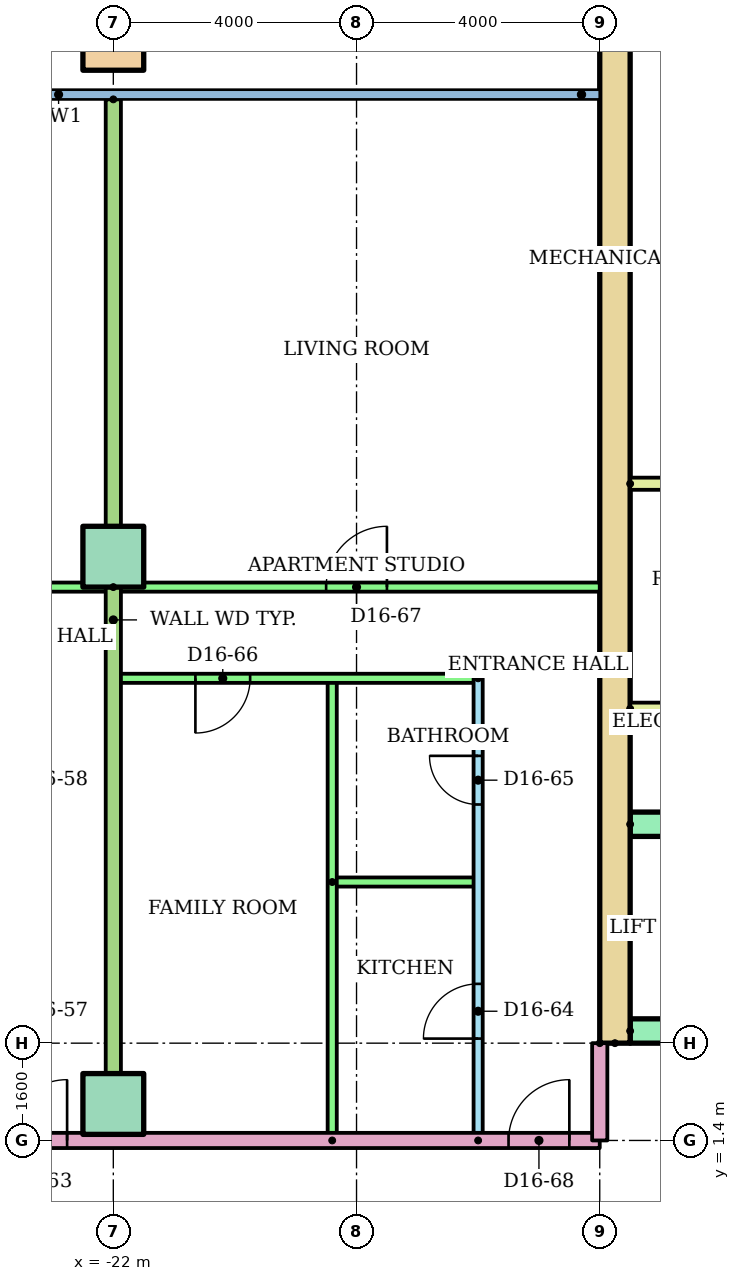
"""IFC4 building model, lengths in metres.
Left out: names, types, materials, properties, quantities, classifications, styles, units other than length and angle.
Written with IfcOpenShell. Run it as: python <this file> out.ifc"""

import sys

from ifc_helpers import new_model, si_unit, direction, frame, frame_2d, origin, origin_2d, place, context, subcontext, project, spatial, rectangle, hollow_rectangle, extrude, element, fill, save


model = new_model("IFC4")
c1 = context("Model", 3, precision=1e-05, world=origin(), true_north=direction((0.0, 1.0)))
c2 = subcontext(c1, "Body", "Model", "MODEL_VIEW")
j1 = project(units=[si_unit("LENGTHUNIT", "METRE"), si_unit("PLANEANGLEUNIT", "RADIAN")], contexts=[c1])
p1 = place(None, origin())
s1 = spatial("IfcSite", under=j1, at=p1, CompositionType="ELEMENT")
p2 = place(p1, origin())
s2 = spatial("IfcBuilding", under=s1, at=p2, CompositionType="ELEMENT")
p3 = place(p2, frame((0.0, 0.0, 60.8)))
s3 = spatial("IfcBuildingStorey", under=s2, at=p3, CompositionType="ELEMENT", Elevation=60.8)
for number, where in (
    (1, (-22.0, 2.0, 0.0)),
    (2, (-22.0, 11.0, 0.0)),
):
    element("IfcColumn", number, at=place(p3, frame(where)), inside=s3, PredefinedType="COLUMN", context=c2, shape_type="SweptSolid", body=[
        extrude(rectangle(XDim=1.0, YDim=1.0, at=origin_2d()), origin(), (0.0, 0.0, 1.0), 3.2),
    ])
p4 = place(p3, frame((-22.0, 19.5, 0.0)))
e3 = element("IfcColumn", 3, at=p4, inside=s3, PredefinedType="COLUMN", context=c2, shape_type="SweptSolid", body=[
    extrude(hollow_rectangle(XDim=1.0, YDim=1.0, WallThickness=0.05, at=origin_2d()), origin(), (0.0, 0.0, 1.0), 3.2),
])
p5 = place(p3, frame((-13.75, 3.0, 0.0), z_axis=(0.0, 0.0, 1.0), x_axis=(0.0, 1.0, 0.0)))
e4 = element("IfcWall", 4, at=p5, inside=s3, PredefinedType="SHEAR", context=c2, shape_type="SweptSolid", body=[
    extrude(rectangle(XDim=17.0, YDim=0.5, at=frame_2d((8.5, 0.0))), origin(), (0.0, 0.0, 1.0), 2.8),
])
p6 = place(p3, frame((-13.5, 3.2, 0.0)))
e5 = element("IfcWall", 5, at=p6, inside=s3, PredefinedType="SHEAR", context=c2, shape_type="SweptSolid", body=[
    extrude(rectangle(XDim=27.0, YDim=0.4, at=frame_2d((13.5, 0.0))), origin(), (0.0, 0.0, 1.0), 2.8),
])
p7 = place(p6, frame((6.861, 0.0, 0.0)))
e6 = element("IfcOpeningElement", 6, at=p7, cuts=e5, PredefinedType="OPENING", context=c2, shape_type="SweptSolid", body=[
    extrude(rectangle(XDim=1.1, YDim=2.1, at=frame_2d((0.55, 1.05))), frame((0.0, 0.21, 0.0), z_axis=(0.0, -1.0, 0.0), x_axis=(1.0, 0.0, 0.0)), (0.0, 0.0, 1.0), 0.42),
])
p8 = place(p6, frame((9.906, 0.0, 0.0)))
e7 = element("IfcOpeningElement", 7, at=p8, cuts=e5, PredefinedType="OPENING", context=c2, shape_type="SweptSolid", body=[
    extrude(rectangle(XDim=1.1, YDim=2.1, at=frame_2d((0.55, 1.05))), frame((0.0, 0.21, 0.0), z_axis=(0.0, -1.0, 0.0), x_axis=(1.0, 0.0, 0.0)), (0.0, 0.0, 1.0), 0.42),
])
p9 = place(p6, frame((15.994, 0.0, 0.0)))
e8 = element("IfcOpeningElement", 8, at=p9, cuts=e5, PredefinedType="OPENING", context=c2, shape_type="SweptSolid", body=[
    extrude(rectangle(XDim=1.1, YDim=2.1, at=frame_2d((0.55, 1.05))), frame((0.0, 0.21, 0.0), z_axis=(0.0, -1.0, 0.0), x_axis=(1.0, 0.0, 0.0)), (0.0, 0.0, 1.0), 0.42),
])
p10 = place(p6, frame((19.039, 0.0, 0.0)))
e9 = element("IfcOpeningElement", 9, at=p10, cuts=e5, PredefinedType="OPENING", context=c2, shape_type="SweptSolid", body=[
    extrude(rectangle(XDim=1.1, YDim=2.1, at=frame_2d((0.55, 1.05))), frame((0.0, 0.21, 0.0), z_axis=(0.0, -1.0, 0.0), x_axis=(1.0, 0.0, 0.0)), (0.0, 0.0, 1.0), 0.42),
])
p11 = place(p6, frame((12.6, 0.0, 0.0)))
e10 = element("IfcOpeningElement", 10, at=p11, cuts=e5, PredefinedType="OPENING", context=c2, shape_type="SweptSolid", body=[
    extrude(rectangle(XDim=1.8, YDim=2.1, at=frame_2d((0.9, 1.05))), frame((0.0, 0.21, 0.0), z_axis=(0.0, -1.0, 0.0), x_axis=(1.0, 0.0, 0.0)), (0.0, 0.0, 1.0), 0.42),
])
p12 = place(p3, frame((-13.5, 6.6, 0.0)))
e11 = element("IfcWall", 11, at=p12, inside=s3, PredefinedType="SHEAR", context=c2, shape_type="SweptSolid", body=[
    extrude(rectangle(XDim=11.978, YDim=0.4, at=frame_2d((5.989, 0.0))), origin(), (0.0, 0.0, 1.0), 2.8),
])
for number, where in (
    (12, (-13.5, 8.5, 0.0)),
    (13, (-13.5, 12.2, 0.0)),
):
    element("IfcWall", number, at=place(p3, frame(where)), inside=s3, PredefinedType="PARTITIONING", context=c2, shape_type="SweptSolid", body=[
        extrude(rectangle(XDim=3.9, YDim=0.2, at=frame_2d((1.95, 0.0))), origin(), (0.0, 0.0, 1.0), 2.8),
    ])
p13 = place(p3, frame((-36.52, 10.5, 0.0)))
e14 = element("IfcWall", 14, at=p13, inside=s3, PredefinedType="PARTITIONING", context=c2, shape_type="SweptSolid", body=[
    extrude(rectangle(XDim=14.52, YDim=0.15, at=frame_2d((7.26, 0.0))), origin(), (0.0, 0.0, 1.0), 2.4),
])
p14 = place(p13, frame((1.97, 0.0, 0.0)))
e15 = element("IfcOpeningElement", 15, at=p14, cuts=e14, PredefinedType="OPENING", context=c2, shape_type="SweptSolid", body=[
    extrude(rectangle(XDim=1.0, YDim=2.1, at=frame_2d((0.5, 1.05))), frame((0.0, 0.085, 0.0), z_axis=(0.0, -1.0, 0.0), x_axis=(1.0, 0.0, 0.0)), (0.0, 0.0, 1.0), 0.17),
])
p15 = place(p13, frame((9.12, 0.0, 0.0)))
e16 = element("IfcOpeningElement", 16, at=p15, cuts=e14, PredefinedType="OPENING", context=c2, shape_type="SweptSolid", body=[
    extrude(rectangle(XDim=1.0, YDim=2.1, at=frame_2d((0.5, 1.05))), frame((0.0, 0.085, 0.0), z_axis=(0.0, -1.0, 0.0), x_axis=(1.0, 0.0, 0.0)), (0.0, 0.0, 1.0), 0.17),
])
p16 = place(p3, frame((-16.0, 1.4, 0.0), z_axis=(0.0, 0.0, 1.0), x_axis=(0.0, 1.0, 0.0)))
e17 = element("IfcWall", 17, at=p16, inside=s3, PredefinedType="PARTITIONING", context=c2, shape_type="SweptSolid", body=[
    extrude(rectangle(XDim=7.6, YDim=0.15, at=frame_2d((3.8, 0.0))), origin(), (0.0, 0.0, 1.0), 2.4),
])
p17 = place(p16, frame((1.675, 0.0, 0.0)))
e18 = element("IfcOpeningElement", 18, at=p17, cuts=e17, PredefinedType="OPENING", context=c2, shape_type="SweptSolid", body=[
    extrude(rectangle(XDim=0.9, YDim=2.1, at=frame_2d((0.45, 1.05))), frame((0.0, 0.085, 0.0), z_axis=(0.0, -1.0, 0.0), x_axis=(1.0, 0.0, 0.0)), (0.0, 0.0, 1.0), 0.17),
])
p18 = place(p16, frame((5.525, 0.0, 0.0)))
e19 = element("IfcOpeningElement", 19, at=p18, cuts=e17, PredefinedType="OPENING", context=c2, shape_type="SweptSolid", body=[
    extrude(rectangle(XDim=0.8, YDim=2.1, at=frame_2d((0.4, 1.05))), frame((0.0, 0.085, 0.0), z_axis=(0.0, -1.0, 0.0), x_axis=(1.0, 0.0, 0.0)), (0.0, 0.0, 1.0), 0.17),
])
p19 = place(p3, frame((-18.4, 5.65, 0.0)))
e20 = element("IfcWall", 20, at=p19, inside=s3, PredefinedType="PARTITIONING", context=c2, shape_type="SweptSolid", body=[
    extrude(rectangle(XDim=2.4, YDim=0.15, at=frame_2d((1.2, 0.0))), origin(), (0.0, 0.0, 1.0), 2.4),
])
p20 = place(p3, frame((-18.4, 1.4, 0.0), z_axis=(0.0, 0.0, 1.0), x_axis=(0.0, 1.0, 0.0)))
e21 = element("IfcWall", 21, at=p20, inside=s3, PredefinedType="PARTITIONING", context=c2, shape_type="SweptSolid", body=[
    extrude(rectangle(XDim=7.6, YDim=0.15, at=frame_2d((3.8, 0.0))), origin(), (0.0, 0.0, 1.0), 2.4),
])
p21 = place(p3, frame((-16.0, 9.0, 0.0), z_axis=(0.0, 0.0, 1.0), x_axis=(-1.0, 0.0, 0.0)))
e22 = element("IfcWall", 22, at=p21, inside=s3, PredefinedType="PARTITIONING", context=c2, shape_type="SweptSolid", body=[
    extrude(rectangle(XDim=6.0, YDim=0.15, at=frame_2d((3.0, 0.0))), origin(), (0.0, 0.0, 1.0), 2.4),
])
p22 = place(p21, frame((3.75, 0.0, 0.0)))
e23 = element("IfcOpeningElement", 23, at=p22, cuts=e22, PredefinedType="OPENING", context=c2, shape_type="SweptSolid", body=[
    extrude(rectangle(XDim=0.9, YDim=2.1, at=frame_2d((0.45, 1.05))), frame((0.0, 0.085, 0.0), z_axis=(0.0, -1.0, 0.0), x_axis=(1.0, 0.0, 0.0)), (0.0, 0.0, 1.0), 0.17),
])
p23 = place(p3, frame((-22.0, 10.5, 0.0)))
e24 = element("IfcWall", 24, at=p23, inside=s3, PredefinedType="PARTITIONING", context=c2, shape_type="SweptSolid", body=[
    extrude(rectangle(XDim=8.0, YDim=0.15, at=frame_2d((4.0, 0.0))), origin(), (0.0, 0.0, 1.0), 2.4),
])
p24 = place(p23, frame((3.5, 0.0, 0.0)))
e25 = element("IfcOpeningElement", 25, at=p24, cuts=e24, PredefinedType="OPENING", context=c2, shape_type="SweptSolid", body=[
    extrude(rectangle(XDim=1.0, YDim=2.1, at=frame_2d((0.5, 1.05))), frame((0.0, 0.085, 0.0), z_axis=(0.0, -1.0, 0.0), x_axis=(1.0, 0.0, 0.0)), (0.0, 0.0, 1.0), 0.17),
])
p25 = place(p3, frame((-22.0, 18.521, 0.0), z_axis=(0.0, 0.0, 1.0), x_axis=(0.0, -1.0, 0.0)))
e26 = element("IfcWall", 26, at=p25, inside=s3, PredefinedType="PARTITIONING", context=c2, shape_type="SweptSolid", body=[
    extrude(rectangle(XDim=17.121, YDim=0.25, at=frame_2d((8.561, 0.0))), origin(), (0.0, 0.0, 1.0), 2.4),
])
p26 = place(p3, frame((-29.0, 1.4, 0.0)))
e27 = element("IfcWall", 27, at=p26, inside=s3, PredefinedType="PARTITIONING", context=c2, shape_type="SweptSolid", body=[
    extrude(rectangle(XDim=15.0, YDim=0.25, at=frame_2d((7.5, 0.0))), origin(), (0.0, 0.0, 1.0), 2.4),
])
p27 = place(p26, frame((5.24, 0.0, 0.0)))
e28 = element("IfcOpeningElement", 28, at=p27, cuts=e27, PredefinedType="OPENING", context=c2, shape_type="SweptSolid", body=[
    extrude(rectangle(XDim=1.0, YDim=2.1, at=frame_2d((0.5, 1.05))), frame((0.0, 0.135, 0.0), z_axis=(0.0, -1.0, 0.0), x_axis=(1.0, 0.0, 0.0)), (0.0, 0.0, 1.0), 0.27),
])
p28 = place(p26, frame((13.5, 0.0, 0.0)))
e29 = element("IfcOpeningElement", 29, at=p28, cuts=e27, PredefinedType="OPENING", context=c2, shape_type="SweptSolid", body=[
    extrude(rectangle(XDim=1.0, YDim=2.1, at=frame_2d((0.5, 1.05))), frame((0.0, 0.135, 0.0), z_axis=(0.0, -1.0, 0.0), x_axis=(1.0, 0.0, 0.0)), (0.0, 0.0, 1.0), 0.27),
])
p29 = place(p3, frame((-14.0, 3.0, 0.0), z_axis=(0.0, 0.0, 1.0), x_axis=(0.0, -1.0, 0.0)))
e30 = element("IfcWall", 30, at=p29, inside=s3, PredefinedType="PARTITIONING", context=c2, shape_type="SweptSolid", body=[
    extrude(rectangle(XDim=1.6, YDim=0.25, at=frame_2d((0.8, 0.0))), origin(), (0.0, 0.0, 1.0), 2.4),
])
p30 = place(p27, origin())
e31 = element("IfcDoor", 31, at=p30, inside=s3, OperationType="SINGLE_SWING_RIGHT", PredefinedType="DOOR", context=c2, shape_type="SweptSolid", body=[
    extrude(rectangle(XDim=1.0, YDim=2.1, at=frame_2d((0.5, 1.05))), frame((0.0, 0.025, 0.0), z_axis=(0.0, -1.0, 0.0), x_axis=(1.0, 0.0, 0.0)), (0.0, 0.0, 1.0), 0.05),
])
fill(e28, e31)
p31 = place(p17, origin())
e32 = element("IfcDoor", 32, at=p31, inside=s3, OperationType="SINGLE_SWING_LEFT", PredefinedType="DOOR", context=c2, shape_type="SweptSolid", body=[
    extrude(rectangle(XDim=0.9, YDim=2.1, at=frame_2d((0.45, 1.05))), frame((0.0, 0.025, 0.0), z_axis=(0.0, -1.0, 0.0), x_axis=(1.0, 0.0, 0.0)), (0.0, 0.0, 1.0), 0.05),
])
fill(e18, e32)
p32 = place(p18, origin())
e33 = element("IfcDoor", 33, at=p32, inside=s3, OperationType="SINGLE_SWING_RIGHT", PredefinedType="DOOR", context=c2, shape_type="SweptSolid", body=[
    extrude(rectangle(XDim=0.8, YDim=2.1, at=frame_2d((0.4, 1.05))), frame((0.0, 0.025, 0.0), z_axis=(0.0, -1.0, 0.0), x_axis=(1.0, 0.0, 0.0)), (0.0, 0.0, 1.0), 0.05),
])
fill(e19, e33)
p33 = place(p22, origin())
e34 = element("IfcDoor", 34, at=p33, inside=s3, OperationType="SINGLE_SWING_RIGHT", PredefinedType="DOOR", context=c2, shape_type="SweptSolid", body=[
    extrude(rectangle(XDim=0.9, YDim=2.1, at=frame_2d((0.45, 1.05))), frame((0.0, 0.025, 0.0), z_axis=(0.0, -1.0, 0.0), x_axis=(1.0, 0.0, 0.0)), (0.0, 0.0, 1.0), 0.05),
])
fill(e23, e34)
p34 = place(p24, origin())
e35 = element("IfcDoor", 35, at=p34, inside=s3, OperationType="SINGLE_SWING_RIGHT", PredefinedType="DOOR", context=c2, shape_type="SweptSolid", body=[
    extrude(rectangle(XDim=1.0, YDim=2.1, at=frame_2d((0.5, 1.05))), frame((0.0, 0.025, 0.0), z_axis=(0.0, -1.0, 0.0), x_axis=(1.0, 0.0, 0.0)), (0.0, 0.0, 1.0), 0.05),
])
fill(e25, e35)
p35 = place(p28, origin())
e36 = element("IfcDoor", 36, at=p35, inside=s3, OperationType="SINGLE_SWING_RIGHT", PredefinedType="DOOR", context=c2, shape_type="SweptSolid", body=[
    extrude(rectangle(XDim=1.0, YDim=2.1, at=frame_2d((0.5, 1.05))), frame((0.0, 0.025, 0.0), z_axis=(0.0, -1.0, 0.0), x_axis=(1.0, 0.0, 0.0)), (0.0, 0.0, 1.0), 0.05),
])
fill(e29, e36)
save(model, sys.argv[1])
